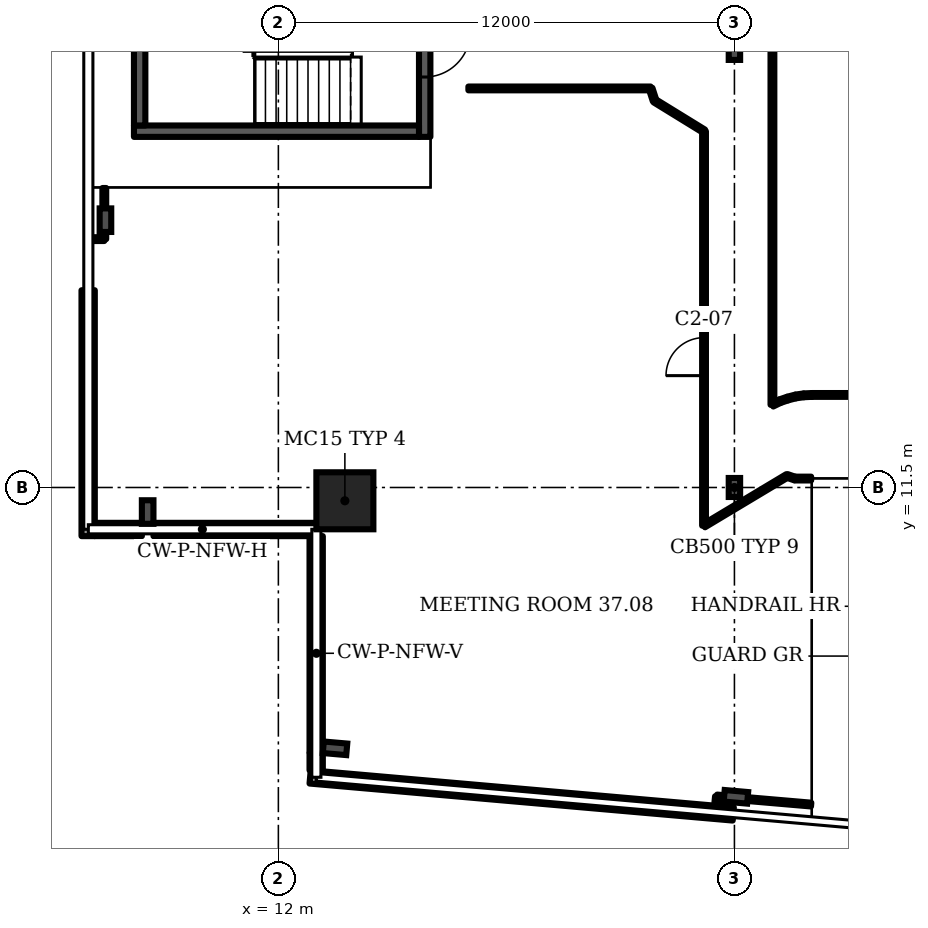
"""IFC4 building model, lengths in metres.
Left out: names, types, materials, properties, quantities, classifications, styles, units other than length and angle.
Written with IfcOpenShell. Run it as: python <this file> out.ifc"""

import sys

from ifc_helpers import new_model, si_unit, direction, frame, frame_2d, origin, origin_2d, place, context, subcontext, project, spatial, rectangle, i_section, extrude, element, fill, save


model = new_model("IFC4")
c1 = context("Model", 3, precision=1e-05, world=origin(), true_north=direction((0.0, 1.0)))
c2 = subcontext(c1, "Body", "Model", "MODEL_VIEW")
j1 = project(units=[si_unit("LENGTHUNIT", "METRE"), si_unit("PLANEANGLEUNIT", "RADIAN")], contexts=[c1])
p1 = place(None, origin())
s1 = spatial("IfcSite", under=j1, at=p1, CompositionType="ELEMENT")
p2 = place(p1, origin())
s2 = spatial("IfcBuilding", under=s1, at=p2, CompositionType="ELEMENT")
p3 = place(p2, frame((0.0, 0.0, 155.5)))
s3 = spatial("IfcBuildingStorey", under=s2, at=p3, CompositionType="ELEMENT", Elevation=155.5)
p4 = place(p3, frame((13.75, 11.15, 0.0), z_axis=(0.0, 0.0, 1.0), x_axis=(1.0, 0.0, 0.0)))
e1 = element("IfcColumn", 1, at=p4, inside=s3, PredefinedType="COLUMN", context=c2, shape_type="SweptSolid", body=[
    extrude(rectangle(XDim=1.5, YDim=1.5, at=origin_2d()), origin(), (0.0, 0.0, 1.0), 3.6),
])
for number, where, z_axis, x_axis in (
    (2, (13.491, 4.637, 0.0), (0.0, 0.0, 1.0), (-0.087, -0.996, 0.0)),
    (3, (24.039, 3.361, 0.0), (0.0, 0.0, 1.0), (-0.087, -0.996, 0.0)),
    (4, (7.45, 18.533, 0.0), (0.0, 0.0, 1.0), (-1.0, 0.0, 0.0)),
    (5, (8.561, 10.854, 0.0), (0.0, 0.0, 1.0), (-1.0, 0.0, 0.0)),
):
    element("IfcColumn", number, at=place(p3, frame(where, z_axis=z_axis, x_axis=x_axis)), inside=s3, PredefinedType="COLUMN", context=c2, shape_type="SweptSolid", body=[
        extrude(i_section(OverallWidth=0.305, OverallDepth=0.62, WebThickness=0.021, FlangeThickness=0.04, FilletRadius=0.027, at=origin_2d()), origin(), (0.0, 0.0, 1.0), 3.6),
    ])
for number, where, z_axis, x_axis in (
    (6, (24.0, 11.5, 0.0), (0.0, 0.0, 1.0), (1.0, 0.0, 0.0)),
    (7, (24.0, 23.0, 0.0), (0.0, 0.0, 1.0), (1.0, 0.0, 0.0)),
):
    element("IfcColumn", number, at=place(p3, frame(where, z_axis=z_axis, x_axis=x_axis)), inside=s3, PredefinedType="COLUMN", context=c2, shape_type="SweptSolid", body=[
        extrude(i_section(OverallWidth=0.3, OverallDepth=0.5, WebThickness=0.014, FlangeThickness=0.028, FilletRadius=0.027, at=origin_2d()), origin(), (0.0, 0.0, 1.0), 3.6),
    ])
p5 = place(p3, frame((12.835, 3.885, 0.0), z_axis=(0.0, 0.0, 1.0), x_axis=(0.996199, -0.087154, 0.0)))
e8 = element("IfcWall", 8, at=p5, inside=s3, PredefinedType="SOLIDWALL", context=c2, shape_type="SweptSolid", body=[
    extrude(rectangle(XDim=11.177, YDim=0.35, at=frame_2d((5.588, 0.0))), origin(), (0.0, 0.0, 1.0), 1.0),
])
p6 = place(p3, frame((6.995, 16.69, 0.0), z_axis=(0.0, 0.0, 1.0), x_axis=(0.0, -1.0, 0.0)))
e9 = element("IfcWall", 9, at=p6, inside=s3, PredefinedType="SOLIDWALL", context=c2, shape_type="SweptSolid", body=[
    extrude(rectangle(XDim=6.47, YDim=0.35, at=frame_2d((3.235, 0.0))), origin(), (0.0, 0.0, 1.0), 1.0),
])
p7 = place(p3, frame((7.17, 10.395, 0.0), z_axis=(0.0, 0.0, 1.0), x_axis=(1.0, 0.0, 0.0)))
e10 = element("IfcWall", 10, at=p7, inside=s3, PredefinedType="SOLIDWALL", context=c2, shape_type="SweptSolid", body=[
    extrude(rectangle(XDim=1.238, YDim=0.35, at=frame_2d((0.619, 0.0))), origin(), (0.0, 0.0, 1.0), 1.0),
])
p8 = place(p3, frame((8.713, 10.395, 0.0), z_axis=(0.0, 0.0, 1.0), x_axis=(1.0, 0.0, 0.0)))
e11 = element("IfcWall", 11, at=p8, inside=s3, PredefinedType="SOLIDWALL", context=c2, shape_type="SweptSolid", body=[
    extrude(rectangle(XDim=4.287, YDim=0.35, at=frame_2d((2.143, 0.0))), origin(), (0.0, 0.0, 1.0), 1.0),
])
p9 = place(p3, frame((12.995, 10.22, 0.0), z_axis=(0.0, 0.0, 1.0), x_axis=(0.0, -1.0, 0.0)))
e12 = element("IfcWall", 12, at=p9, inside=s3, PredefinedType="SOLIDWALL", context=c2, shape_type="SweptSolid", body=[
    extrude(rectangle(XDim=5.693, YDim=0.35, at=frame_2d((2.847, 0.0))), origin(), (0.0, 0.0, 1.0), 1.0),
])
p10 = place(p3, frame((12.995, 4.512, 0.0), z_axis=(0.0, 0.0, 1.0), x_axis=(0.0, -1.0, 0.0)))
e13 = element("IfcWall", 13, at=p10, inside=s3, PredefinedType="SOLIDWALL", context=c2, shape_type="SweptSolid", body=[
    extrude(rectangle(XDim=0.454, YDim=0.35, at=frame_2d((0.227, 0.0))), origin(), (0.0, 0.0, 1.0), 1.0),
])
p11 = place(p3, frame((15.85, 20.725, 0.0), z_axis=(0.0, 0.0, 1.0), x_axis=(0.0, 1.0, 0.0)))
e14 = element("IfcWall", 14, at=p11, inside=s3, PredefinedType="SHEAR", context=c2, shape_type="SweptSolid", body=[
    extrude(rectangle(XDim=4.35, YDim=0.3, at=frame_2d((2.175, 0.0))), origin(), (0.0, 0.0, 1.0), 3.2),
])
p12 = place(p11, frame((1.575, 0.0, 0.0)))
e15 = element("IfcOpeningElement", 15, at=p12, cuts=e14, PredefinedType="OPENING", context=c2, shape_type="SweptSolid", body=[
    extrude(rectangle(XDim=1.2, YDim=2.1, at=frame_2d((0.6, 1.05))), frame((0.0, 0.16, 0.0), z_axis=(0.0, -1.0, 0.0), x_axis=(1.0, 0.0, 0.0)), (0.0, 0.0, 1.0), 0.32),
])
p13 = place(p3, frame((7.02, 18.035, 0.0), z_axis=(0.0, 0.0, 1.0), x_axis=(1.0, 0.0, 0.0)))
e16 = element("IfcWall", 16, at=p13, inside=s3, PredefinedType="PARTITIONING", context=c2, shape_type="SweptSolid", body=[
    extrude(rectangle(XDim=0.4, YDim=0.1, at=frame_2d((0.2, 0.0))), origin(), (0.0, 0.0, 1.0), 3.2),
])
p14 = place(p3, frame((7.42, 18.035, 0.0), z_axis=(0.0, 0.0, 1.0), x_axis=(0.0, 1.0, 0.0)))
e17 = element("IfcWall", 17, at=p14, inside=s3, PredefinedType="PARTITIONING", context=c2, shape_type="SweptSolid", body=[
    extrude(rectangle(XDim=1.345, YDim=0.1, at=frame_2d((0.672, 0.0))), origin(), (0.0, 0.0, 1.0), 2.58),
])
p15 = place(p3, frame((17.0, 22.0, 0.0), z_axis=(0.0, 0.0, 1.0), x_axis=(1.0, 0.0, 0.0)))
e18 = element("IfcWall", 18, at=p15, inside=s3, PredefinedType="PARTITIONING", context=c2, shape_type="SweptSolid", body=[
    extrude(rectangle(XDim=4.795, YDim=0.1, at=frame_2d((2.397, 0.0))), origin(), (0.0, 0.0, 1.0), 3.2),
])
p16 = place(p3, frame((21.9, 21.675, 0.0), z_axis=(0.0, 0.0, 1.0), x_axis=(-0.30742, 0.951572, 0.0)))
e19 = element("IfcWall", 19, at=p16, inside=s3, PredefinedType="PARTITIONING", context=c2, shape_type="SweptSolid", body=[
    extrude(rectangle(XDim=0.342, YDim=0.1, at=frame_2d((0.171, 0.0))), origin(), (0.0, 0.0, 1.0), 3.2),
])
p17 = place(p3, frame((23.2, 20.875, 0.0), z_axis=(0.0, 0.0, 1.0), x_axis=(-0.851649, 0.524104, 0.0)))
e20 = element("IfcWall", 20, at=p17, inside=s3, PredefinedType="PARTITIONING", context=c2, shape_type="SweptSolid", body=[
    extrude(rectangle(XDim=1.527, YDim=0.1, at=frame_2d((0.763, 0.0))), origin(), (0.0, 0.0, 1.0), 3.2),
])
p18 = place(p3, frame((23.2, 10.495, 0.0), z_axis=(0.0, 0.0, 1.0), x_axis=(0.857707, 0.514145, 0.0)))
e21 = element("IfcWall", 21, at=p18, inside=s3, PredefinedType="PARTITIONING", context=c2, shape_type="SweptSolid", body=[
    extrude(rectangle(XDim=2.548, YDim=0.1, at=frame_2d((1.274, 0.0))), origin(), (0.0, 0.0, 1.0), 3.2),
])
p19 = place(p3, frame((23.2, 10.495, 0.0), z_axis=(0.0, 0.0, 1.0), x_axis=(0.0, 1.0, 0.0)))
e22 = element("IfcWall", 22, at=p19, inside=s3, PredefinedType="PARTITIONING", context=c2, shape_type="SweptSolid", body=[
    extrude(rectangle(XDim=10.38, YDim=0.1, at=frame_2d((5.19, 0.0))), origin(), (0.0, 0.0, 1.0), 3.2),
])
p20 = place(p19, frame((3.948, 0.0, 0.0)))
e23 = element("IfcOpeningElement", 23, at=p20, cuts=e22, PredefinedType="OPENING", context=c2, shape_type="SweptSolid", body=[
    extrude(rectangle(XDim=1.0, YDim=2.1, at=frame_2d((0.5, 1.05))), frame((0.0, 0.06, 0.0), z_axis=(0.0, -1.0, 0.0), x_axis=(1.0, 0.0, 0.0)), (0.0, 0.0, 1.0), 0.12),
])
p21 = place(p3, frame((23.502, 2.976, 0.0), z_axis=(0.0, 0.0, 1.0), x_axis=(0.095654, 0.995419, 0.0)))
e24 = element("IfcWall", 24, at=p21, inside=s3, PredefinedType="PARTITIONING", context=c2, shape_type="SweptSolid", body=[
    extrude(rectangle(XDim=0.396, YDim=0.1, at=frame_2d((0.198, 0.0))), origin(), (0.0, 0.0, 1.0), 3.2),
])
p22 = place(p3, frame((25.0, 13.675, 0.0), z_axis=(0.0, 0.0, 1.0), x_axis=(0.0, 1.0, 0.0)))
e25 = element("IfcWall", 25, at=p22, inside=s3, PredefinedType="PARTITIONING", context=c2, shape_type="SweptSolid", body=[
    extrude(rectangle(XDim=11.825, YDim=0.1, at=frame_2d((5.913, 0.0))), origin(), (0.0, 0.0, 1.0), 3.2),
])
p23 = place(p3, frame((25.0, 13.675, 0.0), z_axis=(0.0, 0.0, 1.0), x_axis=(0.899103, 0.437736, 0.0)))
e26 = element("IfcWall", 26, at=p23, inside=s3, PredefinedType="PARTITIONING", context=c2, shape_type="SweptSolid", body=[
    extrude(rectangle(XDim=0.217, YDim=0.1, at=frame_2d((0.108, 0.0))), origin(), (0.0, 0.0, 1.0), 3.2),
])
p24 = place(p3, frame((25.195, 13.77, 0.0), z_axis=(0.0, 0.0, 1.0), x_axis=(0.94617, 0.32366, 0.0)))
e27 = element("IfcWall", 27, at=p24, inside=s3, PredefinedType="PARTITIONING", context=c2, shape_type="SweptSolid", body=[
    extrude(rectangle(XDim=0.217, YDim=0.1, at=frame_2d((0.108, 0.0))), origin(), (0.0, 0.0, 1.0), 3.2),
])
p25 = place(p3, frame((25.4, 13.84, 0.0), z_axis=(0.0, 0.0, 1.0), x_axis=(0.967508, 0.252833, 0.0)))
e28 = element("IfcWall", 28, at=p25, inside=s3, PredefinedType="PARTITIONING", context=c2, shape_type="SweptSolid", body=[
    extrude(rectangle(XDim=0.217, YDim=0.1, at=frame_2d((0.109, 0.0))), origin(), (0.0, 0.0, 1.0), 3.2),
])
p26 = place(p3, frame((25.59, 11.735, 0.0), z_axis=(0.0, 0.0, 1.0), x_axis=(1.0, 0.0, 0.0)))
e29 = element("IfcWall", 29, at=p26, inside=s3, PredefinedType="PARTITIONING", context=c2, shape_type="SweptSolid", body=[
    extrude(rectangle(XDim=0.429, YDim=0.1, at=frame_2d((0.215, 0.0))), origin(), (0.0, 0.0, 1.0), 3.2),
])
p27 = place(p3, frame((25.59, 11.735, 0.0), z_axis=(0.0, 0.0, 1.0), x_axis=(-0.946633, 0.322306, 0.0)))
e30 = element("IfcWall", 30, at=p27, inside=s3, PredefinedType="PARTITIONING", context=c2, shape_type="SweptSolid", body=[
    extrude(rectangle(XDim=0.217, YDim=0.1, at=frame_2d((0.108, 0.0))), origin(), (0.0, 0.0, 1.0), 3.2),
])
p28 = place(p3, frame((25.61, 13.895, 0.0), z_axis=(0.0, 0.0, 1.0), x_axis=(0.990372, 0.138427, 0.0)))
e31 = element("IfcWall", 31, at=p28, inside=s3, PredefinedType="PARTITIONING", context=c2, shape_type="SweptSolid", body=[
    extrude(rectangle(XDim=0.217, YDim=0.1, at=frame_2d((0.108, 0.0))), origin(), (0.0, 0.0, 1.0), 3.2),
])
p29 = place(p3, frame((25.825, 13.925, 0.0), z_axis=(0.0, 0.0, 1.0), x_axis=(0.998923, 0.046488, 0.0)))
e32 = element("IfcWall", 32, at=p29, inside=s3, PredefinedType="PARTITIONING", context=c2, shape_type="SweptSolid", body=[
    extrude(rectangle(XDim=0.215, YDim=0.1, at=frame_2d((0.108, 0.0))), origin(), (0.0, 0.0, 1.0), 3.2),
])
p30 = place(p3, frame((26.019, 3.157, 0.0), z_axis=(0.0, 0.0, 1.0), x_axis=(-0.996317, 0.085749, 0.0)))
e33 = element("IfcWall", 33, at=p30, inside=s3, PredefinedType="PARTITIONING", context=c2, shape_type="SweptSolid", body=[
    extrude(rectangle(XDim=2.489, YDim=0.1, at=frame_2d((1.244, 0.0))), origin(), (0.0, 0.0, 1.0), 2.58),
])
p31 = place(p3, frame((26.04, 13.935, 0.0), z_axis=(0.0, 0.0, 1.0), x_axis=(1.0, 0.0, 0.0)))
e34 = element("IfcWall", 34, at=p31, inside=s3, PredefinedType="PARTITIONING", context=c2, shape_type="SweptSolid", body=[
    extrude(rectangle(XDim=7.0, YDim=0.1, at=frame_2d((3.5, 0.0))), origin(), (0.0, 0.0, 1.0), 3.2),
])
p32 = place(p3, frame((8.2, 20.875, 0.0), z_axis=(0.0, 0.0, 1.0), x_axis=(1.0, 0.0, 0.0)))
e35 = element("IfcWall", 35, at=p32, inside=s3, PredefinedType="SHEAR", context=c2, shape_type="SweptSolid", body=[
    extrude(rectangle(XDim=7.5, YDim=0.3, at=frame_2d((3.75, 0.0))), origin(), (0.0, 0.0, 1.0), 3.2),
])
p33 = place(p3, frame((8.35, 21.025, 0.0), z_axis=(0.0, 0.0, 1.0), x_axis=(0.0, 1.0, 0.0)))
e36 = element("IfcWall", 36, at=p33, inside=s3, PredefinedType="SHEAR", context=c2, shape_type="SweptSolid", body=[
    extrude(rectangle(XDim=3.75, YDim=0.3, at=frame_2d((1.875, 0.0))), origin(), (0.0, 0.0, 1.0), 3.2),
])
p34 = place(p12, origin())
e37 = element("IfcDoor", 37, at=p34, inside=s3, OperationType="SINGLE_SWING_RIGHT", PredefinedType="DOOR", context=c2, shape_type="SweptSolid", body=[
    extrude(rectangle(XDim=1.2, YDim=2.1, at=frame_2d((0.6, 1.05))), frame((0.0, 0.025, 0.0), z_axis=(0.0, -1.0, 0.0), x_axis=(1.0, 0.0, 0.0)), (0.0, 0.0, 1.0), 0.05),
])
fill(e15, e37)
p35 = place(p20, origin())
e38 = element("IfcDoor", 38, at=p35, inside=s3, OperationType="SINGLE_SWING_LEFT", PredefinedType="DOOR", context=c2, shape_type="SweptSolid", body=[
    extrude(rectangle(XDim=1.0, YDim=2.1, at=frame_2d((0.5, 1.05))), frame((0.0, 0.025, 0.0), z_axis=(0.0, -1.0, 0.0), x_axis=(1.0, 0.0, 0.0)), (0.0, 0.0, 1.0), 0.05),
])
fill(e23, e38)
save(model, sys.argv[1])
